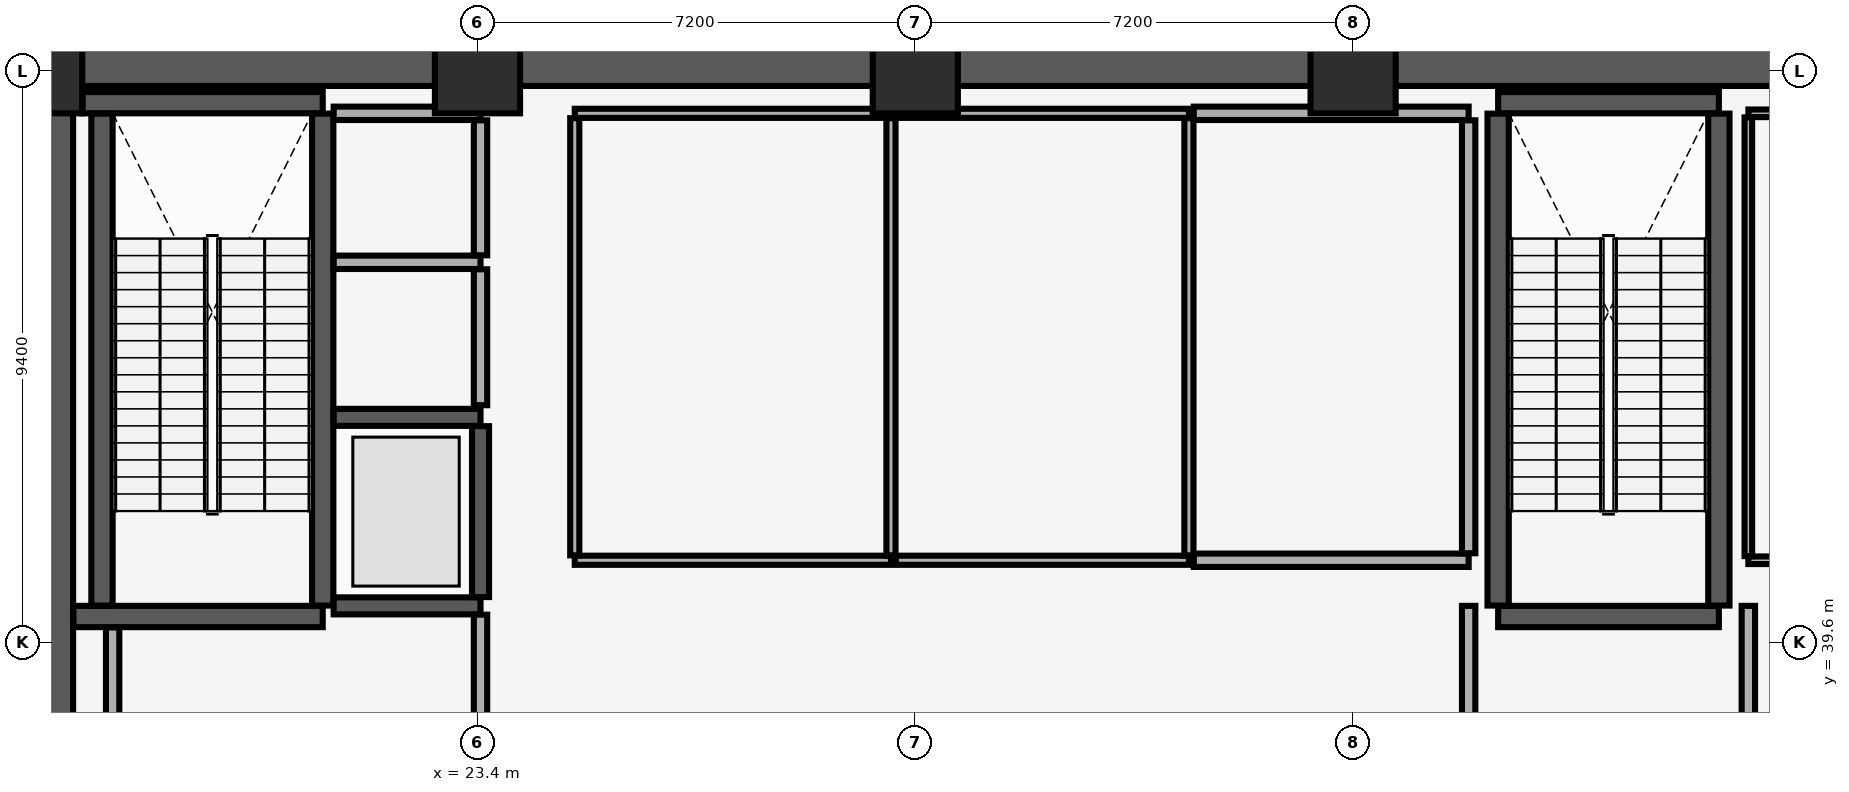
"""IFC4 building model, lengths in metres.
Left out: names, types, materials, properties, quantities, classifications, styles, units other than length and angle.
Written with IfcOpenShell. Run it as: python <this file> out.ifc"""

import sys

from ifc_helpers import new_model, si_unit, direction, frame, frame_2d, origin, origin_2d, place, context, subcontext, project, spatial, rectangle, extrude, element, fill, save


model = new_model("IFC4")
c1 = context("Model", 3, precision=1e-05, world=origin(), true_north=direction((0.0, 1.0)))
c2 = subcontext(c1, "Body", "Model", "MODEL_VIEW")
j1 = project(units=[si_unit("LENGTHUNIT", "METRE"), si_unit("PLANEANGLEUNIT", "RADIAN")], contexts=[c1])
p1 = place(None, origin())
s1 = spatial("IfcSite", under=j1, at=p1, CompositionType="ELEMENT")
p2 = place(p1, origin())
s2 = spatial("IfcBuilding", under=s1, at=p2, CompositionType="ELEMENT")
p3 = place(p2, frame((0.0, 0.0, 8.0)))
s3 = spatial("IfcBuildingStorey", under=s2, at=p3, CompositionType="ELEMENT", Elevation=8.0)
for number, where, z_axis, x_axis in (
    (1, (16.2, 49.0, 0.0), (0.0, 0.0, 1.0), (1.0, 0.0, 0.0)),
    (2, (23.4, 49.0, 0.0), (0.0, 0.0, 1.0), (1.0, 0.0, 0.0)),
    (3, (30.6, 49.0, 0.0), (0.0, 0.0, 1.0), (1.0, 0.0, 0.0)),
    (4, (37.8, 49.0, 0.0), (0.0, 0.0, 1.0), (1.0, 0.0, 0.0)),
):
    element("IfcColumn", number, at=place(p3, frame(where, z_axis=z_axis, x_axis=x_axis)), inside=s3, PredefinedType="COLUMN", context=c2, shape_type="SweptSolid", body=[
        extrude(rectangle(XDim=1.4, YDim=1.4, at=origin_2d()), origin(), (0.0, 0.0, 1.0), 5.68),
    ])
p4 = place(p3, frame((16.2, 49.3, 0.0), z_axis=(0.0, 0.0, 1.0), x_axis=(1.0, 0.0, 0.0)))
e5 = element("IfcWall", 5, at=p4, inside=s3, PredefinedType="SHEAR", context=c2, shape_type="SweptSolid", body=[
    extrude(rectangle(XDim=51.6, YDim=1.1, at=frame_2d((25.8, 0.0))), origin(), (0.0, 0.0, 1.0), 5.68),
])
p5 = place(p3, frame((16.2, 29.4, 0.0), z_axis=(0.0, 0.0, 1.0), x_axis=(0.0, 1.0, 0.0)))
e6 = element("IfcWall", 6, at=p5, inside=s3, PredefinedType="SHEAR", context=c2, shape_type="SweptSolid", body=[
    extrude(rectangle(XDim=19.2, YDim=1.1, at=frame_2d((9.6, 0.0))), origin(), (0.0, 0.0, 1.0), 5.68),
])
p6 = place(p3, frame((16.755, 40.025, 0.0), z_axis=(0.0, 0.0, 1.0), x_axis=(1.0, 0.0, 0.0)))
e7 = element("IfcWall", 7, at=p6, inside=s3, PredefinedType="SHEAR", context=c2, shape_type="SweptSolid", body=[
    extrude(rectangle(XDim=4.1, YDim=0.35, at=frame_2d((2.05, 0.0))), origin(), (0.0, 0.0, 1.0), 5.68),
])
p7 = place(p6, frame((1.71, 0.0, 0.0)))
e8 = element("IfcOpeningElement", 8, at=p7, cuts=e7, PredefinedType="OPENING", context=c2, shape_type="SweptSolid", body=[
    extrude(rectangle(XDim=1.15, YDim=2.15, at=frame_2d((0.575, 1.075))), frame((0.0, 0.185, 0.0), z_axis=(0.0, -1.0, 0.0), x_axis=(1.0, 0.0, 0.0)), (0.0, 0.0, 1.0), 0.37),
])
p8 = place(p3, frame((16.905, 48.475, 0.0), z_axis=(0.0, 0.0, 1.0), x_axis=(1.0, 0.0, 0.0)))
e9 = element("IfcWall", 9, at=p8, inside=s3, PredefinedType="SHEAR", context=c2, shape_type="SweptSolid", body=[
    extrude(rectangle(XDim=3.95, YDim=0.35, at=frame_2d((1.975, 0.0))), origin(), (0.0, 0.0, 1.0), 5.68),
])
for number, where, z_axis, x_axis in (
    (10, (17.225, 40.205, 0.0), (0.0, 0.0, 1.0), (0.0, 1.0, 0.0)),
    (11, (20.855, 40.205, 0.0), (0.0, 0.0, 1.0), (0.0, 1.0, 0.0)),
):
    element("IfcWall", number, at=place(p3, frame(where, z_axis=z_axis, x_axis=x_axis)), inside=s3, PredefinedType="SHEAR", context=c2, shape_type="SweptSolid", body=[
        extrude(rectangle(XDim=8.09, YDim=0.35, at=frame_2d((4.045, 0.0))), origin(), (0.0, 0.0, 1.0), 5.68),
    ])
p9 = place(p3, frame((40.185, 40.025, 0.0), z_axis=(0.0, 0.0, 1.0), x_axis=(1.0, 0.0, 0.0)))
e12 = element("IfcWall", 12, at=p9, inside=s3, PredefinedType="SHEAR", context=c2, shape_type="SweptSolid", body=[
    extrude(rectangle(XDim=3.63, YDim=0.35, at=frame_2d((1.815, 0.0))), origin(), (0.0, 0.0, 1.0), 5.68),
])
p10 = place(p9, frame((1.24, 0.0, 0.0)))
e13 = element("IfcOpeningElement", 13, at=p10, cuts=e12, PredefinedType="OPENING", context=c2, shape_type="SweptSolid", body=[
    extrude(rectangle(XDim=1.15, YDim=2.15, at=frame_2d((0.575, 1.075))), frame((0.0, 0.185, 0.0), z_axis=(0.0, -1.0, 0.0), x_axis=(1.0, 0.0, 0.0)), (0.0, 0.0, 1.0), 0.37),
])
p11 = place(p3, frame((40.185, 48.475, 0.0), z_axis=(0.0, 0.0, 1.0), x_axis=(1.0, 0.0, 0.0)))
e14 = element("IfcWall", 14, at=p11, inside=s3, PredefinedType="SHEAR", context=c2, shape_type="SweptSolid", body=[
    extrude(rectangle(XDim=3.63, YDim=0.35, at=frame_2d((1.815, 0.0))), origin(), (0.0, 0.0, 1.0), 5.68),
])
for number, where, z_axis, x_axis in (
    (15, (40.185, 40.205, 0.0), (0.0, 0.0, 1.0), (0.0, 1.0, 0.0)),
    (16, (43.815, 40.205, 0.0), (0.0, 0.0, 1.0), (0.0, 1.0, 0.0)),
):
    element("IfcWall", number, at=place(p3, frame(where, z_axis=z_axis, x_axis=x_axis)), inside=s3, PredefinedType="SHEAR", context=c2, shape_type="SweptSolid", body=[
        extrude(rectangle(XDim=8.09, YDim=0.35, at=frame_2d((4.045, 0.0))), origin(), (0.0, 0.0, 1.0), 5.68),
    ])
p12 = place(p3, frame((21.035, 40.2, 0.0), z_axis=(0.0, 0.0, 1.0), x_axis=(1.0, 0.0, 0.0)))
e17 = element("IfcWall", 17, at=p12, inside=s3, PredefinedType="SHEAR", context=c2, shape_type="SweptSolid", body=[
    extrude(rectangle(XDim=2.415, YDim=0.28, at=frame_2d((1.208, 0.0))), origin(), (0.0, 0.0, 1.0), 5.68),
])
p13 = place(p12, frame((0.54, 0.0, 0.0)))
e18 = element("IfcOpeningElement", 18, at=p13, cuts=e17, PredefinedType="OPENING", context=c2, shape_type="SweptSolid", body=[
    extrude(rectangle(XDim=1.3, YDim=2.3, at=frame_2d((0.65, 1.15))), frame((0.0, 0.15, 0.0), z_axis=(0.0, -1.0, 0.0), x_axis=(1.0, 0.0, 0.0)), (0.0, 0.0, 1.0), 0.3),
])
p14 = place(p3, frame((21.035, 43.3, 0.0), z_axis=(0.0, 0.0, 1.0), x_axis=(1.0, 0.0, 0.0)))
e19 = element("IfcWall", 19, at=p14, inside=s3, PredefinedType="SHEAR", context=c2, shape_type="SweptSolid", body=[
    extrude(rectangle(XDim=2.415, YDim=0.28, at=frame_2d((1.208, 0.0))), origin(), (0.0, 0.0, 1.0), 5.68),
])
p15 = place(p3, frame((23.45, 40.345, 0.0), z_axis=(0.0, 0.0, 1.0), x_axis=(0.0, 1.0, 0.0)))
e20 = element("IfcWall", 20, at=p15, inside=s3, PredefinedType="SHEAR", context=c2, shape_type="SweptSolid", body=[
    extrude(rectangle(XDim=2.81, YDim=0.28, at=frame_2d((1.405, 0.0))), origin(), (0.0, 0.0, 1.0), 5.68),
])
p16 = place(p3, frame((17.4, 34.415, 0.0), z_axis=(0.0, 0.0, 1.0), x_axis=(0.0, 1.0, 0.0)))
e21 = element("IfcWall", 21, at=p16, inside=s3, PredefinedType="PARTITIONING", context=c2, shape_type="SweptSolid", body=[
    extrude(rectangle(XDim=5.43, YDim=0.22, at=frame_2d((2.715, 0.0))), origin(), (0.0, 0.0, 1.0), 5.68),
])
p17 = place(p3, frame((23.45, 34.415, 0.0), z_axis=(0.0, 0.0, 1.0), x_axis=(0.0, 1.0, 0.0)))
e22 = element("IfcWall", 22, at=p17, inside=s3, PredefinedType="PARTITIONING", context=c2, shape_type="SweptSolid", body=[
    extrude(rectangle(XDim=5.64, YDim=0.22, at=frame_2d((2.82, 0.0))), origin(), (0.0, 0.0, 1.0), 5.68),
])
for number, where, z_axis, x_axis in (
    (23, (39.7, 34.415, 0.0), (0.0, 0.0, 1.0), (0.0, 1.0, 0.0)),
    (24, (44.3, 34.415, 0.0), (0.0, 0.0, 1.0), (0.0, 1.0, 0.0)),
):
    element("IfcWall", number, at=place(p3, frame(where, z_axis=z_axis, x_axis=x_axis)), inside=s3, PredefinedType="PARTITIONING", context=c2, shape_type="SweptSolid", body=[
        extrude(rectangle(XDim=5.785, YDim=0.22, at=frame_2d((2.893, 0.0))), origin(), (0.0, 0.0, 1.0), 5.68),
    ])
p18 = place(p3, frame((21.035, 45.85, 0.0), z_axis=(0.0, 0.0, 1.0), x_axis=(1.0, 0.0, 0.0)))
e25 = element("IfcWall", 25, at=p18, inside=s3, PredefinedType="PARTITIONING", context=c2, shape_type="SweptSolid", body=[
    extrude(rectangle(XDim=2.415, YDim=0.22, at=frame_2d((1.208, 0.0))), origin(), (0.0, 0.0, 1.0), 5.68),
])
p19 = place(p3, frame((23.45, 43.5, 0.0), z_axis=(0.0, 0.0, 1.0), x_axis=(0.0, 1.0, 0.0)))
e26 = element("IfcWall", 26, at=p19, inside=s3, PredefinedType="PARTITIONING", context=c2, shape_type="SweptSolid", body=[
    extrude(rectangle(XDim=2.235, YDim=0.22, at=frame_2d((1.118, 0.0))), origin(), (0.0, 0.0, 1.0), 5.68),
])
p20 = place(p19, frame((0.725, 0.0, 0.0)))
e27 = element("IfcOpeningElement", 27, at=p20, cuts=e26, PredefinedType="OPENING", context=c2, shape_type="SweptSolid", body=[
    extrude(rectangle(XDim=0.85, YDim=2.1, at=frame_2d((0.425, 1.05))), frame((0.0, 0.12, 0.0), z_axis=(0.0, -1.0, 0.0), x_axis=(1.0, 0.0, 0.0)), (0.0, 0.0, 1.0), 0.24),
])
p21 = place(p3, frame((21.035, 48.3, 0.0), z_axis=(0.0, 0.0, 1.0), x_axis=(1.0, 0.0, 0.0)))
e28 = element("IfcWall", 28, at=p21, inside=s3, PredefinedType="PARTITIONING", context=c2, shape_type="SweptSolid", body=[
    extrude(rectangle(XDim=2.415, YDim=0.22, at=frame_2d((1.208, 0.0))), origin(), (0.0, 0.0, 1.0), 5.68),
])
p22 = place(p3, frame((23.45, 45.965, 0.0), z_axis=(0.0, 0.0, 1.0), x_axis=(0.0, 1.0, 0.0)))
e29 = element("IfcWall", 29, at=p22, inside=s3, PredefinedType="PARTITIONING", context=c2, shape_type="SweptSolid", body=[
    extrude(rectangle(XDim=2.22, YDim=0.22, at=frame_2d((1.11, 0.0))), origin(), (0.0, 0.0, 1.0), 5.68),
])
p23 = place(p22, frame((0.96, 0.0, 0.0)))
e30 = element("IfcOpeningElement", 30, at=p23, cuts=e29, PredefinedType="OPENING", context=c2, shape_type="SweptSolid", body=[
    extrude(rectangle(XDim=0.85, YDim=2.1, at=frame_2d((0.425, 1.05))), frame((0.0, 0.12, 0.0), z_axis=(0.0, -1.0, 0.0), x_axis=(1.0, 0.0, 0.0)), (0.0, 0.0, 1.0), 0.24),
])
p24 = place(p3, frame((25.0, 40.95, 0.0), z_axis=(0.0, 0.0, 1.0), x_axis=(1.0, 0.0, 0.0)))
e31 = element("IfcWall", 31, at=p24, inside=s3, PredefinedType="PARTITIONING", context=c2, shape_type="SweptSolid", body=[
    extrude(rectangle(XDim=5.2, YDim=0.15, at=frame_2d((2.6, 0.0))), origin(), (0.0, 0.0, 1.0), 5.68),
])
p25 = place(p24, frame((2.175, 0.0, 0.0)))
e32 = element("IfcOpeningElement", 32, at=p25, cuts=e31, PredefinedType="OPENING", context=c2, shape_type="SweptSolid", body=[
    extrude(rectangle(XDim=0.85, YDim=2.1, at=frame_2d((0.425, 1.05))), frame((0.0, 0.085, 0.0), z_axis=(0.0, -1.0, 0.0), x_axis=(1.0, 0.0, 0.0)), (0.0, 0.0, 1.0), 0.17),
])
p26 = place(p3, frame((25.0, 48.3, 0.0), z_axis=(0.0, 0.0, 1.0), x_axis=(1.0, 0.0, 0.0)))
e33 = element("IfcWall", 33, at=p26, inside=s3, PredefinedType="PARTITIONING", context=c2, shape_type="SweptSolid", body=[
    extrude(rectangle(XDim=5.2, YDim=0.15, at=frame_2d((2.6, 0.0))), origin(), (0.0, 0.0, 1.0), 5.68),
])
for number, where, z_axis, x_axis in (
    (34, (25.0, 41.03, 0.0), (0.0, 0.0, 1.0), (0.0, 1.0, 0.0)),
    (35, (30.2, 41.03, 0.0), (0.0, 0.0, 1.0), (0.0, 1.0, 0.0)),
):
    element("IfcWall", number, at=place(p3, frame(where, z_axis=z_axis, x_axis=x_axis)), inside=s3, PredefinedType="PARTITIONING", context=c2, shape_type="SweptSolid", body=[
        extrude(rectangle(XDim=7.19, YDim=0.15, at=frame_2d((3.595, 0.0))), origin(), (0.0, 0.0, 1.0), 5.68),
    ])
p27 = place(p3, frame((30.28, 40.95, 0.0), z_axis=(0.0, 0.0, 1.0), x_axis=(1.0, 0.0, 0.0)))
e36 = element("IfcWall", 36, at=p27, inside=s3, PredefinedType="PARTITIONING", context=c2, shape_type="SweptSolid", body=[
    extrude(rectangle(XDim=4.82, YDim=0.15, at=frame_2d((2.41, 0.0))), origin(), (0.0, 0.0, 1.0), 5.68),
])
p28 = place(p27, frame((1.87, 0.0, 0.0)))
e37 = element("IfcOpeningElement", 37, at=p28, cuts=e36, PredefinedType="OPENING", context=c2, shape_type="SweptSolid", body=[
    extrude(rectangle(XDim=1.0, YDim=2.15, at=frame_2d((0.5, 1.075))), frame((0.0, 0.085, 0.0), z_axis=(0.0, -1.0, 0.0), x_axis=(1.0, 0.0, 0.0)), (0.0, 0.0, 1.0), 0.17),
])
p29 = place(p3, frame((30.28, 48.3, 0.0), z_axis=(0.0, 0.0, 1.0), x_axis=(1.0, 0.0, 0.0)))
e38 = element("IfcWall", 38, at=p29, inside=s3, PredefinedType="PARTITIONING", context=c2, shape_type="SweptSolid", body=[
    extrude(rectangle(XDim=4.82, YDim=0.15, at=frame_2d((2.41, 0.0))), origin(), (0.0, 0.0, 1.0), 5.68),
])
p30 = place(p3, frame((35.1, 41.03, 0.0), z_axis=(0.0, 0.0, 1.0), x_axis=(0.0, 1.0, 0.0)))
e39 = element("IfcWall", 39, at=p30, inside=s3, PredefinedType="PARTITIONING", context=c2, shape_type="SweptSolid", body=[
    extrude(rectangle(XDim=7.19, YDim=0.15, at=frame_2d((3.595, 0.0))), origin(), (0.0, 0.0, 1.0), 5.68),
])
p31 = place(p3, frame((35.18, 40.95, 0.0), z_axis=(0.0, 0.0, 1.0), x_axis=(1.0, 0.0, 0.0)))
e40 = element("IfcWall", 40, at=p31, inside=s3, PredefinedType="PARTITIONING", context=c2, shape_type="SweptSolid", body=[
    extrude(rectangle(XDim=4.52, YDim=0.22, at=frame_2d((2.26, 0.0))), origin(), (0.0, 0.0, 1.0), 5.68),
])
p32 = place(p31, frame((0.795, 0.0, 0.0)))
e41 = element("IfcOpeningElement", 41, at=p32, cuts=e40, PredefinedType="OPENING", context=c2, shape_type="SweptSolid", body=[
    extrude(rectangle(XDim=0.85, YDim=2.1, at=frame_2d((0.425, 1.05))), frame((0.0, 0.12, 0.0), z_axis=(0.0, -1.0, 0.0), x_axis=(1.0, 0.0, 0.0)), (0.0, 0.0, 1.0), 0.24),
])
p33 = place(p3, frame((35.18, 48.3, 0.0), z_axis=(0.0, 0.0, 1.0), x_axis=(1.0, 0.0, 0.0)))
e42 = element("IfcWall", 42, at=p33, inside=s3, PredefinedType="PARTITIONING", context=c2, shape_type="SweptSolid", body=[
    extrude(rectangle(XDim=4.52, YDim=0.22, at=frame_2d((2.26, 0.0))), origin(), (0.0, 0.0, 1.0), 5.68),
])
p34 = place(p3, frame((39.7, 41.065, 0.0), z_axis=(0.0, 0.0, 1.0), x_axis=(0.0, 1.0, 0.0)))
e43 = element("IfcWall", 43, at=p34, inside=s3, PredefinedType="PARTITIONING", context=c2, shape_type="SweptSolid", body=[
    extrude(rectangle(XDim=7.12, YDim=0.22, at=frame_2d((3.56, 0.0))), origin(), (0.0, 0.0, 1.0), 5.68),
])
p35 = place(p3, frame((44.3, 40.95, 0.0), z_axis=(0.0, 0.0, 1.0), x_axis=(1.0, 0.0, 0.0)))
e44 = element("IfcWall", 44, at=p35, inside=s3, PredefinedType="PARTITIONING", context=c2, shape_type="SweptSolid", body=[
    extrude(rectangle(XDim=3.1, YDim=0.125, at=frame_2d((1.55, 0.0))), origin(), (0.0, 0.0, 1.0), 5.68),
])
p36 = place(p35, frame((1.1, 0.0, 0.0)))
e45 = element("IfcOpeningElement", 45, at=p36, cuts=e44, PredefinedType="OPENING", context=c2, shape_type="SweptSolid", body=[
    extrude(rectangle(XDim=0.9, YDim=2.1, at=frame_2d((0.45, 1.05))), frame((0.0, 0.073, 0.0), z_axis=(0.0, -1.0, 0.0), x_axis=(1.0, 0.0, 0.0)), (0.0, 0.0, 1.0), 0.145),
])
p37 = place(p3, frame((44.3, 48.3, 0.0), z_axis=(0.0, 0.0, 1.0), x_axis=(1.0, 0.0, 0.0)))
e46 = element("IfcWall", 46, at=p37, inside=s3, PredefinedType="PARTITIONING", context=c2, shape_type="SweptSolid", body=[
    extrude(rectangle(XDim=3.1, YDim=0.125, at=frame_2d((1.55, 0.0))), origin(), (0.0, 0.0, 1.0), 5.68),
])
p38 = place(p3, frame((44.3, 41.018, 0.0), z_axis=(0.0, 0.0, 1.0), x_axis=(0.0, 1.0, 0.0)))
e47 = element("IfcWall", 47, at=p38, inside=s3, PredefinedType="PARTITIONING", context=c2, shape_type="SweptSolid", body=[
    extrude(rectangle(XDim=7.215, YDim=0.125, at=frame_2d((3.607, 0.0))), origin(), (0.0, 0.0, 1.0), 5.68),
])
p39 = place(p7, origin())
e48 = element("IfcDoor", 48, at=p39, inside=s3, OperationType="SINGLE_SWING_LEFT", PredefinedType="DOOR", context=c2, shape_type="SweptSolid", body=[
    extrude(rectangle(XDim=1.15, YDim=2.15, at=frame_2d((0.575, 1.075))), frame((0.0, 0.025, 0.0), z_axis=(0.0, -1.0, 0.0), x_axis=(1.0, 0.0, 0.0)), (0.0, 0.0, 1.0), 0.05),
])
fill(e8, e48)
p40 = place(p10, origin())
e49 = element("IfcDoor", 49, at=p40, inside=s3, OperationType="SINGLE_SWING_RIGHT", PredefinedType="DOOR", context=c2, shape_type="SweptSolid", body=[
    extrude(rectangle(XDim=1.15, YDim=2.15, at=frame_2d((0.575, 1.075))), frame((0.0, 0.025, 0.0), z_axis=(0.0, -1.0, 0.0), x_axis=(1.0, 0.0, 0.0)), (0.0, 0.0, 1.0), 0.05),
])
fill(e13, e49)
p41 = place(p13, origin())
e50 = element("IfcDoor", 50, at=p41, inside=s3, OperationType="DOUBLE_DOOR_SLIDING", PredefinedType="DOOR", context=c2, shape_type="SweptSolid", body=[
    extrude(rectangle(XDim=1.3, YDim=2.3, at=frame_2d((0.65, 1.15))), frame((0.0, 0.025, 0.0), z_axis=(0.0, -1.0, 0.0), x_axis=(1.0, 0.0, 0.0)), (0.0, 0.0, 1.0), 0.05),
])
fill(e18, e50)
p42 = place(p20, origin())
e51 = element("IfcDoor", 51, at=p42, inside=s3, OperationType="SINGLE_SWING_LEFT", PredefinedType="DOOR", context=c2, shape_type="SweptSolid", body=[
    extrude(rectangle(XDim=0.85, YDim=2.1, at=frame_2d((0.425, 1.05))), frame((0.0, 0.025, 0.0), z_axis=(0.0, -1.0, 0.0), x_axis=(1.0, 0.0, 0.0)), (0.0, 0.0, 1.0), 0.05),
])
fill(e27, e51)
p43 = place(p23, origin())
e52 = element("IfcDoor", 52, at=p43, inside=s3, OperationType="SINGLE_SWING_RIGHT", PredefinedType="DOOR", context=c2, shape_type="SweptSolid", body=[
    extrude(rectangle(XDim=0.85, YDim=2.1, at=frame_2d((0.425, 1.05))), frame((0.0, 0.025, 0.0), z_axis=(0.0, -1.0, 0.0), x_axis=(1.0, 0.0, 0.0)), (0.0, 0.0, 1.0), 0.05),
])
fill(e30, e52)
p44 = place(p25, origin())
e53 = element("IfcDoor", 53, at=p44, inside=s3, OperationType="SINGLE_SWING_LEFT", PredefinedType="DOOR", context=c2, shape_type="SweptSolid", body=[
    extrude(rectangle(XDim=0.85, YDim=2.1, at=frame_2d((0.425, 1.05))), frame((0.0, 0.025, 0.0), z_axis=(0.0, -1.0, 0.0), x_axis=(1.0, 0.0, 0.0)), (0.0, 0.0, 1.0), 0.05),
])
fill(e32, e53)
p45 = place(p28, origin())
e54 = element("IfcDoor", 54, at=p45, inside=s3, OperationType="SINGLE_SWING_RIGHT", PredefinedType="DOOR", context=c2, shape_type="SweptSolid", body=[
    extrude(rectangle(XDim=1.0, YDim=2.15, at=frame_2d((0.5, 1.075))), frame((0.0, 0.025, 0.0), z_axis=(0.0, -1.0, 0.0), x_axis=(1.0, 0.0, 0.0)), (0.0, 0.0, 1.0), 0.05),
])
fill(e37, e54)
p46 = place(p32, origin())
e55 = element("IfcDoor", 55, at=p46, inside=s3, OperationType="SINGLE_SWING_LEFT", PredefinedType="DOOR", context=c2, shape_type="SweptSolid", body=[
    extrude(rectangle(XDim=0.85, YDim=2.1, at=frame_2d((0.425, 1.05))), frame((0.0, 0.025, 0.0), z_axis=(0.0, -1.0, 0.0), x_axis=(1.0, 0.0, 0.0)), (0.0, 0.0, 1.0), 0.05),
])
fill(e41, e55)
save(model, sys.argv[1])
